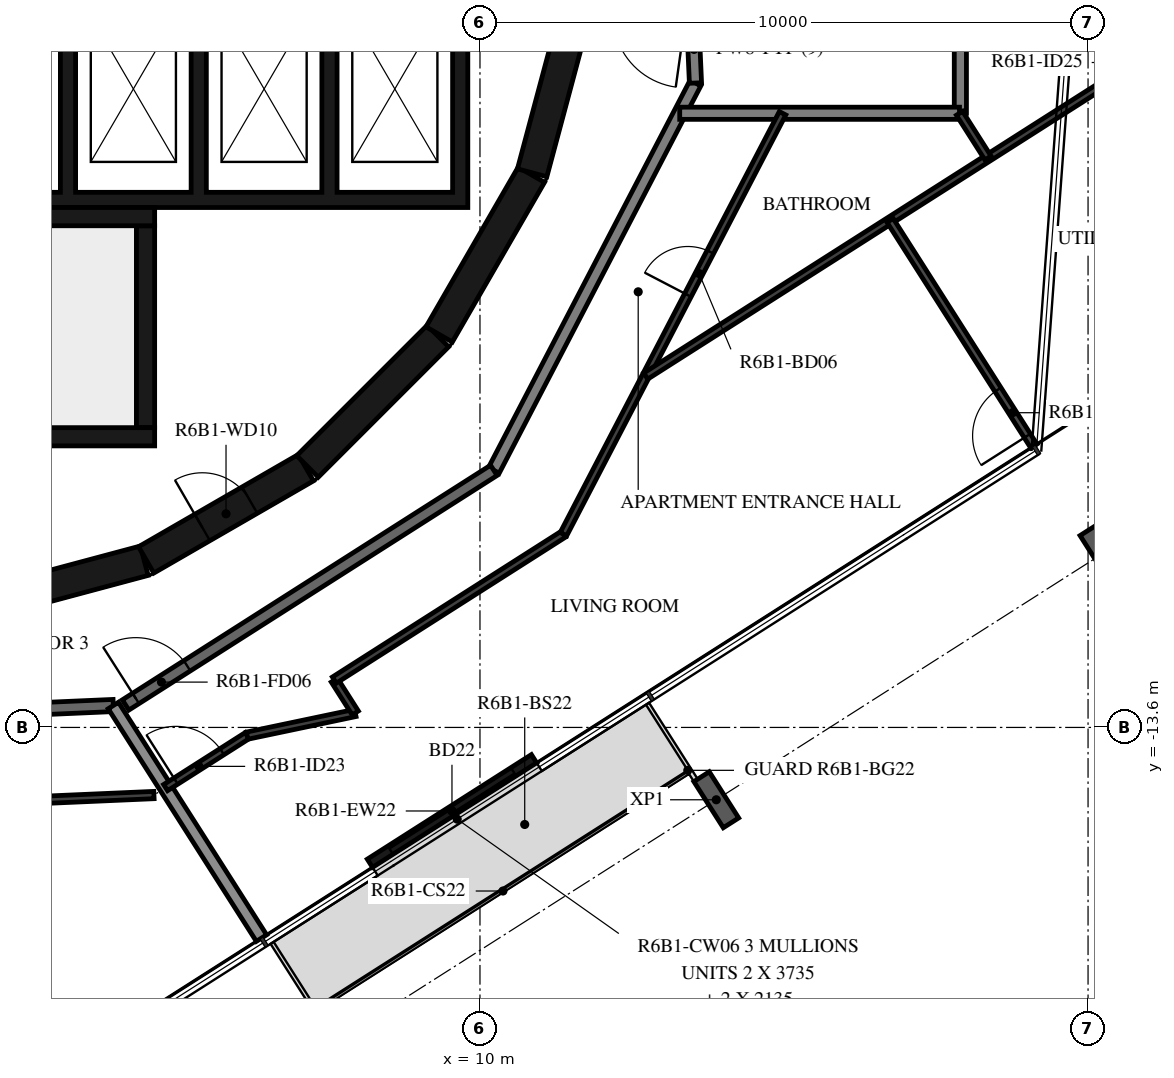
"""IFC4 building model, lengths in metres.
Left out: names, types, materials, properties, quantities, classifications, styles, units other than length and angle.
Written with IfcOpenShell. Run it as: python <this file> out.ifc"""

import sys

from ifc_helpers import new_model, si_unit, direction, frame, frame_2d, origin, origin_2d, place, context, subcontext, project, spatial, polyline, rectangle, i_section, outline, extrude, element, fill, save


model = new_model("IFC4")
c1 = context("Model", 3, precision=1e-05, world=origin(), true_north=direction((0.0, 1.0)))
c2 = subcontext(c1, "Body", "Model", "MODEL_VIEW")
j1 = project(units=[si_unit("LENGTHUNIT", "METRE"), si_unit("PLANEANGLEUNIT", "RADIAN")], contexts=[c1])
p1 = place(None, origin())
s1 = spatial("IfcSite", under=j1, at=p1, CompositionType="ELEMENT")
p2 = place(p1, origin())
s2 = spatial("IfcBuilding", under=s1, at=p2, CompositionType="ELEMENT")
p3 = place(p2, frame((0.0, 0.0, 237.2)))
s3 = spatial("IfcBuildingStorey", under=s2, at=p3, CompositionType="ELEMENT", Elevation=237.2)
for number, where, z_axis, x_axis in (
    (1, (13.886, -14.79, -0.38), (0.0, 0.0, 1.0), (-0.843, -0.537, 0.0)),
    (2, (20.237, -10.744, -0.38), (0.0, 0.0, 1.0), (-0.843, -0.537, 0.0)),
):
    element("IfcColumn", number, at=place(p3, frame(where, z_axis=z_axis, x_axis=x_axis)), inside=s3, PredefinedType="COLUMN", context=c2, shape_type="SweptSolid", body=[
        extrude(i_section(OverallWidth=0.3, OverallDepth=0.9, WebThickness=0.019, FlangeThickness=0.035, FilletRadius=0.03, at=origin_2d()), origin(), (0.0, 0.0, 1.0), 3.5),
    ])
p4 = place(p3, frame((8.19, -15.833, 0.0), z_axis=(0.0, 0.0, 1.0), x_axis=(0.843419508298, 0.53725555653, 0.0)))
e3 = element("IfcWall", 3, at=p4, inside=s3, PredefinedType="STANDARD", context=c2, shape_type="SweptSolid", body=[
    extrude(rectangle(XDim=3.2, YDim=0.16, at=frame_2d((1.6, 0.0))), origin(), (0.0, 0.0, 1.0), 3.12),
])
p5 = place(p4, frame((0.4, 0.0, 0.0)))
e4 = element("IfcOpeningElement", 4, at=p5, cuts=e3, PredefinedType="OPENING", context=c2, shape_type="SweptSolid", body=[
    extrude(rectangle(XDim=2.4, YDim=2.4, at=frame_2d((1.2, 1.2))), frame((0.0, 0.09, 0.0), z_axis=(0.0, -1.0, 0.0), x_axis=(1.0, 0.0, 0.0)), (0.0, 0.0, 1.0), 0.18),
])
p6 = place(p3, frame((1.55, -11.643, 0.0), z_axis=(0.0, 0.0, 1.0), x_axis=(0.965948410781, 0.258734743916, 0.0)))
e5 = element("IfcWall", 5, at=p6, inside=s3, PredefinedType="SHEAR", context=c2, shape_type="SweptSolid", body=[
    extrude(rectangle(XDim=3.033, YDim=0.5, at=frame_2d((1.516, 0.0))), origin(), (0.0, 0.0, 1.0), 3.12),
])
p7 = place(p3, frame((4.51, -10.845, 0.0), z_axis=(0.0, 0.0, 1.0), x_axis=(0.865975092491, 0.500087131594, 0.0)))
e6 = element("IfcWall", 6, at=p7, inside=s3, PredefinedType="SHEAR", context=c2, shape_type="SweptSolid", body=[
    extrude(rectangle(XDim=3.033, YDim=0.5, at=frame_2d((1.516, 0.0))), origin(), (0.0, 0.0, 1.0), 3.12),
])
p8 = place(p7, frame((1.066, 0.0, 0.0)))
e7 = element("IfcOpeningElement", 7, at=p8, cuts=e6, PredefinedType="OPENING", context=c2, shape_type="SweptSolid", body=[
    extrude(rectangle(XDim=0.9, YDim=2.1, at=frame_2d((0.45, 1.05))), frame((0.0, 0.26, 0.0), z_axis=(0.0, -1.0, 0.0), x_axis=(1.0, 0.0, 0.0)), (0.0, 0.0, 1.0), 0.52),
])
p9 = place(p3, frame((7.164, -9.308, 0.0), z_axis=(0.0, 0.0, 1.0), x_axis=(0.707106781187, 0.707106781187, 0.0)))
e8 = element("IfcWall", 8, at=p9, inside=s3, PredefinedType="SHEAR", context=c2, shape_type="SweptSolid", body=[
    extrude(rectangle(XDim=3.032, YDim=0.5, at=frame_2d((1.516, 0.0))), origin(), (0.0, 0.0, 1.0), 3.12),
])
for number, where, z_axis, x_axis in (
    (9, (9.329, -7.137, 0.0), (0.0, 0.0, 1.0), (0.5, 0.866, 0.0)),
    (10, (10.858, -4.479, 0.0), (0.0, 0.0, 1.0), (0.259, 0.966, 0.0)),
):
    element("IfcWall", number, at=place(p3, frame(where, z_axis=z_axis, x_axis=x_axis)), inside=s3, PredefinedType="SHEAR", context=c2, shape_type="SweptSolid", body=[
        extrude(rectangle(XDim=3.033, YDim=0.5, at=frame_2d((1.516, 0.0))), origin(), (0.0, 0.0, 1.0), 3.12),
    ])
p10 = place(p3, frame((-2.4, -5.2, 0.0), z_axis=(0.0, 0.0, 1.0), x_axis=(1.0, 0.0, 0.0)))
e11 = element("IfcWall", 11, at=p10, inside=s3, PredefinedType="SHEAR", context=c2, shape_type="SweptSolid", body=[
    extrude(rectangle(XDim=7.05, YDim=0.3, at=frame_2d((3.525, 0.0))), origin(), (0.0, 0.0, 1.0), 3.12),
])
p11 = place(p3, frame((4.5, -8.67, 0.0), z_axis=(0.0, 0.0, 1.0), x_axis=(0.0, 1.0, 0.0)))
e12 = element("IfcWall", 12, at=p11, inside=s3, PredefinedType="SHEAR", context=c2, shape_type="SweptSolid", body=[
    extrude(rectangle(XDim=3.32, YDim=0.3, at=frame_2d((1.66, 0.0))), origin(), (0.0, 0.0, 1.0), 3.12),
])
p12 = place(p3, frame((0.1, -8.82, 0.0), z_axis=(0.0, 0.0, 1.0), x_axis=(1.0, 0.0, 0.0)))
e13 = element("IfcWall", 13, at=p12, inside=s3, PredefinedType="SHEAR", context=c2, shape_type="SweptSolid", body=[
    extrude(rectangle(XDim=4.55, YDim=0.3, at=frame_2d((2.275, 0.0))), origin(), (0.0, 0.0, 1.0), 3.12),
])
p13 = place(p3, origin())
e14 = element("IfcWall", 14, at=p13, inside=s3, PredefinedType="SHEAR", context=c2, shape_type="SweptSolid", body=[
    extrude(outline(polyline([(9.8, -5.05), (9.8, -4.8), (9.8, -1.9), (9.55, -1.9), (9.55, -4.8), (7.65, -4.8), (7.65, -1.9), (7.4, -1.9), (7.4, -4.8), (5.5, -4.8), (5.5, -1.9), (5.25, -1.9), (5.25, -4.8), (3.35, -4.8), (3.35, -1.9), (3.1, -1.9), (3.1, -4.8), (1.2, -4.8), (1.2, -1.9), (0.95, -1.9), (0.95, -4.8), (-0.95, -4.8), (-0.95, -1.9), (-1.2, -1.9), (-1.2, -4.8), (-3.1, -4.8), (-3.1, -1.9), (-3.35, -1.9), (-3.35, -4.8), (-5.25, -4.8), (-5.25, -1.9), (-5.5, -1.9), (-5.5, -4.8), (-7.4, -4.8), (-7.4, -1.9), (-7.65, -1.9), (-7.65, -4.8), (-9.55, -4.8), (-9.55, -1.9), (-9.8, -1.9), (-9.8, -4.8), (-9.8, -5.05), (9.8, -5.05)])), origin(), (0.0, 0.0, 1.0), 3.12),
])
p14 = place(p3, frame((10.228, -9.372, 0.0), z_axis=(0.0, 0.0, 1.0), x_axis=(0.461759464021, 0.887005184532, 0.0)))
e15 = element("IfcWall", 15, at=p14, inside=s3, PredefinedType="STANDARD", context=c2, shape_type="SweptSolid", body=[
    extrude(rectangle(XDim=7.181, YDim=0.2, at=frame_2d((3.591, 0.0))), origin(), (0.0, 0.0, 1.0), 3.12),
])
p15 = place(p3, frame((13.544, -3.003, 0.0), z_axis=(0.0, 0.0, 1.0), x_axis=(-0.043666917606, 0.999046145234, 0.0)))
e16 = element("IfcWall", 16, at=p15, inside=s3, PredefinedType="STANDARD", context=c2, shape_type="SweptSolid", body=[
    extrude(rectangle(XDim=1.107, YDim=0.2, at=frame_2d((0.553, 0.0))), origin(), (0.0, 0.0, 1.0), 3.12),
])
p16 = place(p3, frame((-3.003, -13.544, 0.0), z_axis=(0.0, 0.0, 1.0), x_axis=(0.999048221872, 0.043619380718, 0.0)))
e17 = element("IfcWall", 17, at=p16, inside=s3, PredefinedType="STANDARD", context=c2, shape_type="SweptSolid", body=[
    extrude(rectangle(XDim=6.979, YDim=0.2, at=frame_2d((3.49, 0.0))), origin(), (0.0, 0.0, 1.0), 3.12),
])
p17 = place(p16, frame((1.6, 0.0, 0.0)))
e18 = element("IfcOpeningElement", 18, at=p17, cuts=e17, PredefinedType="OPENING", context=c2, shape_type="SweptSolid", body=[
    extrude(rectangle(XDim=1.0, YDim=2.1, at=frame_2d((0.5, 1.05))), frame((0.0, 0.11, 0.0), z_axis=(0.0, -1.0, 0.0), x_axis=(1.0, 0.0, 0.0)), (0.0, 0.0, 1.0), 0.22),
])
p18 = place(p3, frame((4.172, -13.231, 0.0), z_axis=(0.0, 0.0, 1.0), x_axis=(0.843388394728, 0.537304397561, 0.0)))
e19 = element("IfcWall", 19, at=p18, inside=s3, PredefinedType="STANDARD", context=c2, shape_type="SweptSolid", body=[
    extrude(rectangle(XDim=7.181, YDim=0.2, at=frame_2d((3.59, 0.0))), origin(), (0.0, 0.0, 1.0), 3.12),
])
p19 = place(p18, frame((0.2, 0.0, 0.0)))
e20 = element("IfcOpeningElement", 20, at=p19, cuts=e19, PredefinedType="OPENING", context=c2, shape_type="SweptSolid", body=[
    extrude(rectangle(XDim=1.0, YDim=2.1, at=frame_2d((0.5, 1.05))), frame((0.0, 0.11, 0.0), z_axis=(0.0, -1.0, 0.0), x_axis=(1.0, 0.0, 0.0)), (0.0, 0.0, 1.0), 0.22),
])
p20 = place(p3, frame((17.9, -3.5, 0.0), z_axis=(0.0, 0.0, 1.0), x_axis=(0.0, 1.0, 0.0)))
e21 = element("IfcWall", 21, at=p20, inside=s3, PredefinedType="STANDARD", context=c2, shape_type="SweptSolid", body=[
    extrude(rectangle(XDim=7.0, YDim=0.2, at=frame_2d((3.5, 0.0))), origin(), (0.0, 0.0, 1.0), 3.12),
])
p21 = place(p3, frame((13.285, -3.5, 0.0), z_axis=(0.0, 0.0, 1.0), x_axis=(1.0, 0.0, 0.0)))
e22 = element("IfcWall", 22, at=p21, inside=s3, PredefinedType="STANDARD", context=c2, shape_type="SweptSolid", body=[
    extrude(rectangle(XDim=4.601, YDim=0.2, at=frame_2d((2.301, 0.0))), origin(), (0.0, 0.0, 1.0), 3.12),
])
p22 = place(p3, frame((6.407, -17.064, 0.0), z_axis=(0.0, 0.0, 1.0), x_axis=(-0.537324777979, 0.843375410461, 0.0)))
e23 = element("IfcWall", 23, at=p22, inside=s3, PredefinedType="STANDARD", context=c2, shape_type="SweptSolid", body=[
    extrude(rectangle(XDim=4.535, YDim=0.2, at=frame_2d((2.268, 0.0))), origin(), (0.0, 0.0, 1.0), 2.73),
])
p23 = place(p3, frame((-1.852, -14.995, 0.0), z_axis=(0.0, 0.0, 1.0), x_axis=(0.999047773092, 0.043629658249, 0.0)))
e24 = element("IfcWall", 24, at=p23, inside=s3, PredefinedType="PARTITIONING", context=c2, shape_type="SweptSolid", body=[
    extrude(rectangle(XDim=6.497, YDim=0.12, at=frame_2d((3.248, 0.0))), origin(), (0.0, 0.0, 1.0), 3.12),
])
p24 = place(p3, frame((4.83, -14.59, 0.0), z_axis=(0.0, 0.0, 1.0), x_axis=(0.843395898817, 0.537292618467, 0.0)))
e25 = element("IfcWall", 25, at=p24, inside=s3, PredefinedType="PARTITIONING", context=c2, shape_type="SweptSolid", body=[
    extrude(rectangle(XDim=1.59, YDim=0.12, at=frame_2d((0.795, 0.0))), origin(), (0.0, 0.0, 1.0), 3.12),
])
p25 = place(p24, frame((0.2, 0.0, 0.0)))
e26 = element("IfcOpeningElement", 26, at=p25, cuts=e25, PredefinedType="OPENING", context=c2, shape_type="SweptSolid", body=[
    extrude(rectangle(XDim=0.9, YDim=2.1, at=frame_2d((0.45, 1.05))), frame((0.0, 0.07, 0.0), z_axis=(0.0, -1.0, 0.0), x_axis=(1.0, 0.0, 0.0)), (0.0, 0.0, 1.0), 0.14),
])
p26 = place(p3, frame((6.172, -13.735, 0.0), z_axis=(0.0, 0.0, 1.0), x_axis=(0.978659442958, 0.205488916271, 0.0)))
e27 = element("IfcWall", 27, at=p26, inside=s3, PredefinedType="PARTITIONING", context=c2, shape_type="SweptSolid", body=[
    extrude(rectangle(XDim=1.817, YDim=0.12, at=frame_2d((0.908, 0.0))), origin(), (0.0, 0.0, 1.0), 3.12),
])
p27 = place(p3, frame((7.949, -13.362, 0.0), z_axis=(0.0, 0.0, 1.0), x_axis=(-0.537343932066, 0.843363206852, 0.0)))
e28 = element("IfcWall", 28, at=p27, inside=s3, PredefinedType="PARTITIONING", context=c2, shape_type="SweptSolid", body=[
    extrude(rectangle(XDim=0.641, YDim=0.12, at=frame_2d((0.32, 0.0))), origin(), (0.0, 0.0, 1.0), 3.12),
])
p28 = place(p3, frame((7.605, -12.822, 0.0), z_axis=(0.0, 0.0, 1.0), x_axis=(0.843413865585, 0.537264414733, 0.0)))
e29 = element("IfcWall", 29, at=p28, inside=s3, PredefinedType="PARTITIONING", context=c2, shape_type="SweptSolid", body=[
    extrude(rectangle(XDim=4.467, YDim=0.12, at=frame_2d((2.234, 0.0))), origin(), (0.0, 0.0, 1.0), 3.12),
])
p29 = place(p3, frame((11.373, -10.421, 0.0), z_axis=(0.0, 0.0, 1.0), x_axis=(0.461746745223, 0.887011805601, 0.0)))
e30 = element("IfcWall", 30, at=p29, inside=s3, PredefinedType="PARTITIONING", context=c2, shape_type="SweptSolid", body=[
    extrude(rectangle(XDim=7.803, YDim=0.12, at=frame_2d((3.901, 0.0))), origin(), (0.0, 0.0, 1.0), 3.12),
])
p30 = place(p29, frame((4.431, 0.0, 0.0)))
e31 = element("IfcOpeningElement", 31, at=p30, cuts=e30, PredefinedType="OPENING", context=c2, shape_type="SweptSolid", body=[
    extrude(rectangle(XDim=0.8, YDim=2.1, at=frame_2d((0.4, 1.05))), frame((0.0, 0.07, 0.0), z_axis=(0.0, -1.0, 0.0), x_axis=(1.0, 0.0, 0.0)), (0.0, 0.0, 1.0), 0.14),
])
p31 = place(p3, frame((21.368, -2.316, 0.0), z_axis=(0.0, 0.0, 1.0), x_axis=(-0.843388627156, -0.537304032726, 0.0)))
e32 = element("IfcWall", 32, at=p31, inside=s3, PredefinedType="PARTITIONING", context=c2, shape_type="SweptSolid", body=[
    extrude(rectangle(XDim=10.246, YDim=0.12, at=frame_2d((5.123, 0.0))), origin(), (0.0, 0.0, 1.0), 3.12),
])
p32 = place(p31, frame((0.2, 0.0, 0.0)))
e33 = element("IfcOpeningElement", 33, at=p32, cuts=e32, PredefinedType="OPENING", context=c2, shape_type="SweptSolid", body=[
    extrude(rectangle(XDim=0.9, YDim=2.1, at=frame_2d((0.45, 1.05))), frame((0.0, 0.07, 0.0), z_axis=(0.0, -1.0, 0.0), x_axis=(1.0, 0.0, 0.0)), (0.0, 0.0, 1.0), 0.14),
])
p33 = place(p3, frame((19.109, -8.972, 0.0), z_axis=(0.0, 0.0, 1.0), x_axis=(-0.537345751125, 0.843362047847, 0.0)))
e34 = element("IfcWall", 34, at=p33, inside=s3, PredefinedType="PARTITIONING", context=c2, shape_type="SweptSolid", body=[
    extrude(rectangle(XDim=4.4, YDim=0.12, at=frame_2d((2.2, 0.0))), origin(), (0.0, 0.0, 1.0), 2.73),
])
p34 = place(p33, frame((0.2, 0.0, 0.0)))
e35 = element("IfcOpeningElement", 35, at=p34, cuts=e34, PredefinedType="OPENING", context=c2, shape_type="SweptSolid", body=[
    extrude(rectangle(XDim=0.9, YDim=2.1, at=frame_2d((0.45, 1.05))), frame((0.0, 0.07, 0.0), z_axis=(0.0, -1.0, 0.0), x_axis=(1.0, 0.0, 0.0)), (0.0, 0.0, 1.0), 0.14),
])
p35 = place(p3, frame((18.355, -4.236, 0.0), z_axis=(0.0, 0.0, 1.0), x_axis=(-0.537400605047, 0.843327095316, 0.0)))
e36 = element("IfcWall", 36, at=p35, inside=s3, PredefinedType="PARTITIONING", context=c2, shape_type="SweptSolid", body=[
    extrude(rectangle(XDim=0.872, YDim=0.12, at=frame_2d((0.436, 0.0))), origin(), (0.0, 0.0, 1.0), 3.12),
])
p36 = place(p5, origin())
e37 = element("IfcDoor", 37, at=p36, inside=s3, OperationType="DOUBLE_DOOR_SLIDING", PredefinedType="DOOR", context=c2, shape_type="SweptSolid", body=[
    extrude(rectangle(XDim=2.4, YDim=2.4, at=frame_2d((1.2, 1.2))), frame((0.0, 0.025, 0.0), z_axis=(0.0, -1.0, 0.0), x_axis=(1.0, 0.0, 0.0)), (0.0, 0.0, 1.0), 0.05),
])
fill(e4, e37)
p37 = place(p8, origin())
e38 = element("IfcDoor", 38, at=p37, inside=s3, OperationType="SINGLE_SWING_RIGHT", PredefinedType="DOOR", context=c2, shape_type="SweptSolid", body=[
    extrude(rectangle(XDim=0.9, YDim=2.1, at=frame_2d((0.45, 1.05))), frame((0.0, 0.025, 0.0), z_axis=(0.0, -1.0, 0.0), x_axis=(1.0, 0.0, 0.0)), (0.0, 0.0, 1.0), 0.05),
])
fill(e7, e38)
p38 = place(p19, origin())
e39 = element("IfcDoor", 39, at=p38, inside=s3, OperationType="SINGLE_SWING_LEFT", PredefinedType="DOOR", context=c2, shape_type="SweptSolid", body=[
    extrude(rectangle(XDim=1.0, YDim=2.1, at=frame_2d((0.5, 1.05))), frame((0.0, 0.025, 0.0), z_axis=(0.0, -1.0, 0.0), x_axis=(1.0, 0.0, 0.0)), (0.0, 0.0, 1.0), 0.05),
])
fill(e20, e39)
p39 = place(p25, origin())
e40 = element("IfcDoor", 40, at=p39, inside=s3, OperationType="SINGLE_SWING_LEFT", PredefinedType="DOOR", context=c2, shape_type="SweptSolid", body=[
    extrude(rectangle(XDim=0.9, YDim=2.1, at=frame_2d((0.45, 1.05))), frame((0.0, 0.025, 0.0), z_axis=(0.0, -1.0, 0.0), x_axis=(1.0, 0.0, 0.0)), (0.0, 0.0, 1.0), 0.05),
])
fill(e26, e40)
p40 = place(p30, origin())
e41 = element("IfcDoor", 41, at=p40, inside=s3, OperationType="SINGLE_SWING_RIGHT", PredefinedType="DOOR", context=c2, shape_type="SweptSolid", body=[
    extrude(rectangle(XDim=0.8, YDim=2.1, at=frame_2d((0.4, 1.05))), frame((0.0, 0.025, 0.0), z_axis=(0.0, -1.0, 0.0), x_axis=(1.0, 0.0, 0.0)), (0.0, 0.0, 1.0), 0.05),
])
fill(e31, e41)
p41 = place(p34, origin())
e42 = element("IfcDoor", 42, at=p41, inside=s3, OperationType="SINGLE_SWING_RIGHT", PredefinedType="DOOR", context=c2, shape_type="SweptSolid", body=[
    extrude(rectangle(XDim=0.9, YDim=2.1, at=frame_2d((0.45, 1.05))), frame((0.0, 0.025, 0.0), z_axis=(0.0, -1.0, 0.0), x_axis=(1.0, 0.0, 0.0)), (0.0, 0.0, 1.0), 0.05),
])
fill(e35, e42)
save(model, sys.argv[1])
